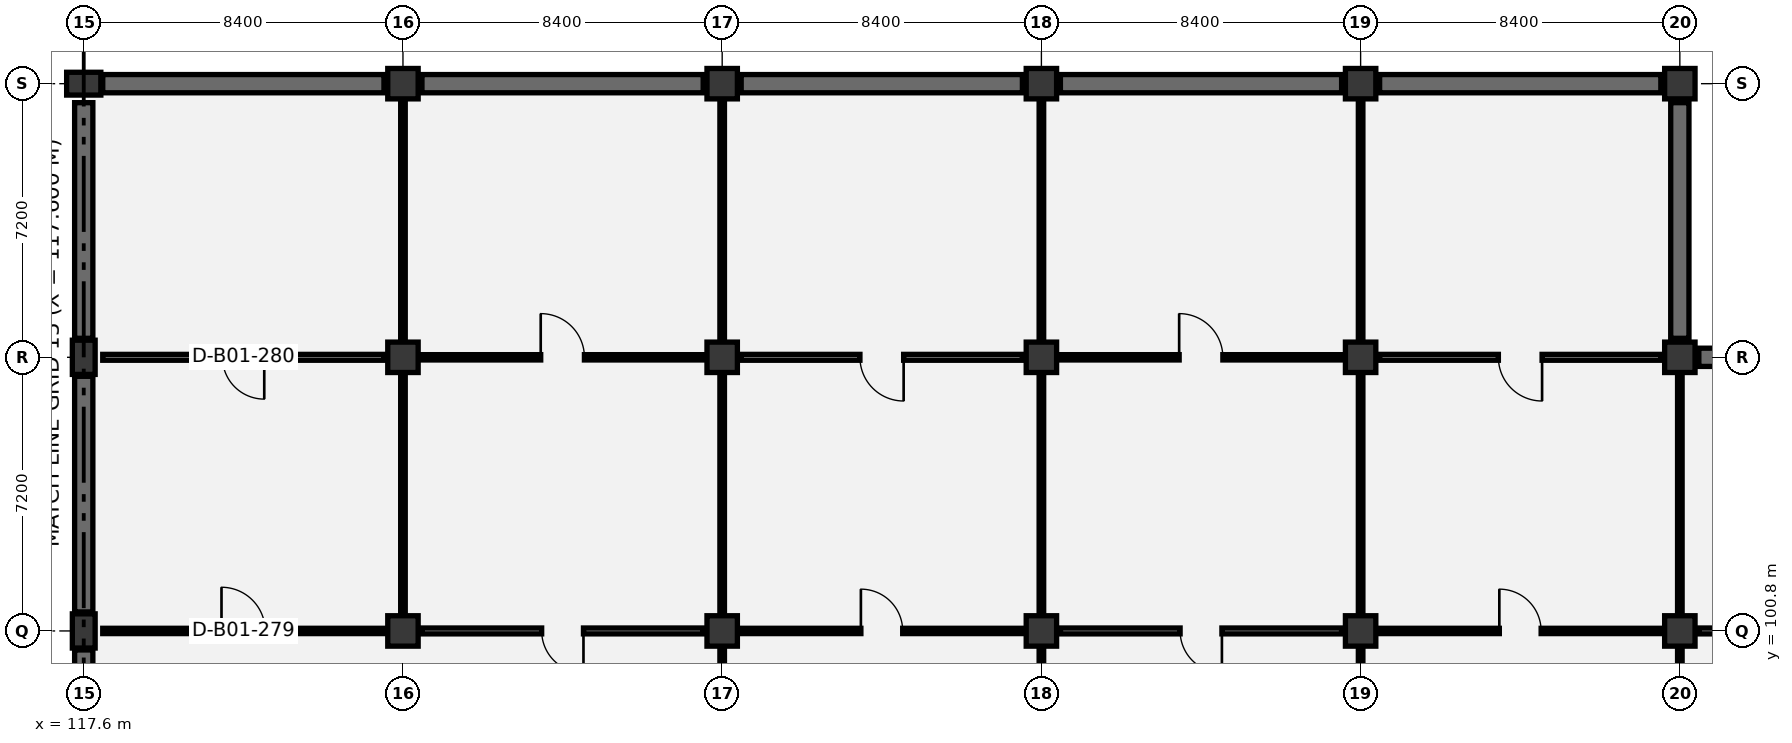
"""IFC4 building model, lengths in metres.
Left out: names, types, materials, properties, quantities, classifications, styles, units other than length and angle.
Written with IfcOpenShell. Run it as: python <this file> out.ifc"""

import sys

from ifc_helpers import new_model, si_unit, direction, frame, frame_2d, origin, origin_2d, place, context, subcontext, project, spatial, rectangle, extrude, element, fill, save


model = new_model("IFC4")
c1 = context("Model", 3, precision=1e-05, world=origin(), true_north=direction((0.0, 1.0)))
c2 = subcontext(c1, "Body", "Model", "MODEL_VIEW")
j1 = project(units=[si_unit("LENGTHUNIT", "METRE"), si_unit("PLANEANGLEUNIT", "RADIAN")], contexts=[c1])
p1 = place(None, origin())
s1 = spatial("IfcSite", under=j1, at=p1, CompositionType="ELEMENT")
p2 = place(p1, origin())
s2 = spatial("IfcBuilding", under=s1, at=p2, CompositionType="ELEMENT")
p3 = place(p2, frame((0.0, 0.0, -4.8)))
s3 = spatial("IfcBuildingStorey", under=s2, at=p3, CompositionType="ELEMENT", Elevation=-4.8)
for number, where, z_axis, x_axis in (
    (1, (117.6, 100.8, 0.0), (0.0, 0.0, 1.0), (1.0, 0.0, 0.0)),
    (2, (117.6, 108.0, 0.0), (0.0, 0.0, 1.0), (1.0, 0.0, 0.0)),
    (3, (117.6, 115.2, 0.0), (0.0, 0.0, 1.0), (0.0, 1.0, 0.0)),
):
    element("IfcColumn", number, at=place(p3, frame(where, z_axis=z_axis, x_axis=x_axis)), inside=s3, PredefinedType="COLUMN", context=c2, shape_type="SweptSolid", body=[
        extrude(rectangle(XDim=0.6, YDim=0.9, at=origin_2d()), origin(), (0.0, 0.0, 1.0), 4.8),
    ])
for number, where, z_axis, x_axis in (
    (4, (126.0, 100.8, 0.0), (0.0, 0.0, 1.0), (1.0, 0.0, 0.0)),
    (5, (126.0, 108.0, 0.0), (0.0, 0.0, 1.0), (1.0, 0.0, 0.0)),
    (6, (126.0, 115.2, 0.0), (0.0, 0.0, 1.0), (1.0, 0.0, 0.0)),
    (7, (134.4, 100.8, 0.0), (0.0, 0.0, 1.0), (1.0, 0.0, 0.0)),
    (8, (134.4, 108.0, 0.0), (0.0, 0.0, 1.0), (1.0, 0.0, 0.0)),
    (9, (134.4, 115.2, 0.0), (0.0, 0.0, 1.0), (1.0, 0.0, 0.0)),
    (10, (142.8, 100.8, 0.0), (0.0, 0.0, 1.0), (1.0, 0.0, 0.0)),
    (11, (142.8, 108.0, 0.0), (0.0, 0.0, 1.0), (1.0, 0.0, 0.0)),
    (12, (142.8, 115.2, 0.0), (0.0, 0.0, 1.0), (1.0, 0.0, 0.0)),
    (13, (151.2, 100.8, 0.0), (0.0, 0.0, 1.0), (1.0, 0.0, 0.0)),
    (14, (151.2, 108.0, 0.0), (0.0, 0.0, 1.0), (1.0, 0.0, 0.0)),
    (15, (151.2, 115.2, 0.0), (0.0, 0.0, 1.0), (1.0, 0.0, 0.0)),
    (16, (159.6, 100.8, 0.0), (0.0, 0.0, 1.0), (1.0, 0.0, 0.0)),
    (17, (159.6, 108.0, 0.0), (0.0, 0.0, 1.0), (1.0, 0.0, 0.0)),
    (18, (159.6, 115.2, 0.0), (0.0, 0.0, 1.0), (1.0, 0.0, 0.0)),
):
    element("IfcColumn", number, at=place(p3, frame(where, z_axis=z_axis, x_axis=x_axis)), inside=s3, PredefinedType="COLUMN", context=c2, shape_type="SweptSolid", body=[
        extrude(rectangle(XDim=0.8, YDim=0.8, at=origin_2d()), origin(), (0.0, 0.0, 1.0), 4.8),
    ])
for number, where, z_axis, x_axis in (
    (19, (117.6, 94.1, 0.0), (0.0, 0.0, 1.0), (0.0, 1.0, 0.0)),
    (20, (117.6, 101.3, 0.0), (0.0, 0.0, 1.0), (0.0, 1.0, 0.0)),
):
    element("IfcWall", number, at=place(p3, frame(where, z_axis=z_axis, x_axis=x_axis)), inside=s3, PredefinedType="USERDEFINED", context=c2, shape_type="SweptSolid", body=[
        extrude(rectangle(XDim=6.2, YDim=0.48, at=frame_2d((3.1, 0.0))), origin(), (0.0, 0.0, 1.0), 4.575),
    ])
p4 = place(p3, frame((118.1, 115.2, 0.0), z_axis=(0.0, 0.0, 1.0), x_axis=(1.0, 0.0, 0.0)))
e21 = element("IfcWall", 21, at=p4, inside=s3, PredefinedType="USERDEFINED", context=c2, shape_type="SweptSolid", body=[
    extrude(rectangle(XDim=7.4, YDim=0.48, at=frame_2d((3.7, 0.0))), origin(), (0.0, 0.0, 1.0), 4.45),
])
p5 = place(p3, frame((117.6, 108.5, 0.0), z_axis=(0.0, 0.0, 1.0), x_axis=(0.0, 1.0, 0.0)))
e22 = element("IfcWall", 22, at=p5, inside=s3, PredefinedType="USERDEFINED", context=c2, shape_type="SweptSolid", body=[
    extrude(rectangle(XDim=6.2, YDim=0.48, at=frame_2d((3.1, 0.0))), origin(), (0.0, 0.0, 1.0), 4.575),
])
p6 = place(p3, frame((126.5, 115.2, 0.0), z_axis=(0.0, 0.0, 1.0), x_axis=(1.0, 0.0, 0.0)))
e23 = element("IfcWall", 23, at=p6, inside=s3, PredefinedType="USERDEFINED", context=c2, shape_type="SweptSolid", body=[
    extrude(rectangle(XDim=7.4, YDim=0.48, at=frame_2d((3.7, 0.0))), origin(), (0.0, 0.0, 1.0), 4.45),
])
p7 = place(p3, frame((134.9, 115.2, 0.0), z_axis=(0.0, 0.0, 1.0), x_axis=(1.0, 0.0, 0.0)))
e24 = element("IfcWall", 24, at=p7, inside=s3, PredefinedType="USERDEFINED", context=c2, shape_type="SweptSolid", body=[
    extrude(rectangle(XDim=7.4, YDim=0.48, at=frame_2d((3.7, 0.0))), origin(), (0.0, 0.0, 1.0), 4.45),
])
p8 = place(p3, frame((143.3, 115.2, 0.0), z_axis=(0.0, 0.0, 1.0), x_axis=(1.0, 0.0, 0.0)))
e25 = element("IfcWall", 25, at=p8, inside=s3, PredefinedType="USERDEFINED", context=c2, shape_type="SweptSolid", body=[
    extrude(rectangle(XDim=7.4, YDim=0.48, at=frame_2d((3.7, 0.0))), origin(), (0.0, 0.0, 1.0), 4.45),
])
p9 = place(p3, frame((151.7, 115.2, 0.0), z_axis=(0.0, 0.0, 1.0), x_axis=(1.0, 0.0, 0.0)))
e26 = element("IfcWall", 26, at=p9, inside=s3, PredefinedType="USERDEFINED", context=c2, shape_type="SweptSolid", body=[
    extrude(rectangle(XDim=7.4, YDim=0.48, at=frame_2d((3.7, 0.0))), origin(), (0.0, 0.0, 1.0), 4.45),
])
p10 = place(p3, frame((159.6, 108.5, 0.0), z_axis=(0.0, 0.0, 1.0), x_axis=(0.0, 1.0, 0.0)))
e27 = element("IfcWall", 27, at=p10, inside=s3, PredefinedType="USERDEFINED", context=c2, shape_type="SweptSolid", body=[
    extrude(rectangle(XDim=6.2, YDim=0.48, at=frame_2d((3.1, 0.0))), origin(), (0.0, 0.0, 1.0), 4.45),
])
p11 = place(p3, frame((160.1, 108.0, 0.0), z_axis=(0.0, 0.0, 1.0), x_axis=(1.0, 0.0, 0.0)))
e28 = element("IfcWall", 28, at=p11, inside=s3, PredefinedType="USERDEFINED", context=c2, shape_type="SweptSolid", body=[
    extrude(rectangle(XDim=7.4, YDim=0.48, at=frame_2d((3.7, 0.0))), origin(), (0.0, 0.0, 1.0), 4.45),
])
p12 = place(p3, frame((159.72, 115.2, 0.0), z_axis=(0.0, 0.0, 1.0), x_axis=(1.0, 0.0, 0.0)))
e29 = element("IfcWall", 29, at=p12, inside=s3, PredefinedType="PARAPET", context=c2, shape_type="SweptSolid", body=[
    extrude(rectangle(XDim=8.16, YDim=0.22, at=frame_2d((4.08, 0.0))), origin(), (0.0, 0.0, 1.0), 1.15),
])
p13 = place(p3, frame((118.1, 100.8, 0.0), z_axis=(0.0, 0.0, 1.0), x_axis=(1.0, 0.0, 0.0)))
e30 = element("IfcWall", 30, at=p13, inside=s3, PredefinedType="PARTITIONING", context=c2, shape_type="SweptSolid", body=[
    extrude(rectangle(XDim=7.4, YDim=0.14, at=frame_2d((3.7, 0.0))), origin(), (0.0, 0.0, 1.0), 3.545),
])
p14 = place(p13, frame((3.125, 0.0, 0.0)))
e31 = element("IfcOpeningElement", 31, at=p14, cuts=e30, PredefinedType="OPENING", context=c2, shape_type="SweptSolid", body=[
    extrude(rectangle(XDim=1.15, YDim=2.1, at=frame_2d((0.575, 1.05))), frame((0.0, 0.08, 0.0), z_axis=(0.0, -1.0, 0.0), x_axis=(1.0, 0.0, 0.0)), (0.0, 0.0, 1.0), 0.16),
])
p15 = place(p3, frame((126.0, 101.3, 0.0), z_axis=(0.0, 0.0, 1.0), x_axis=(0.0, 1.0, 0.0)))
e32 = element("IfcWall", 32, at=p15, inside=s3, PredefinedType="PARTITIONING", context=c2, shape_type="SweptSolid", body=[
    extrude(rectangle(XDim=6.2, YDim=0.12, at=frame_2d((3.1, 0.0))), origin(), (0.0, 0.0, 1.0), 3.645),
])
p16 = place(p3, frame((118.1, 108.0, 0.0), z_axis=(0.0, 0.0, 1.0), x_axis=(1.0, 0.0, 0.0)))
e33 = element("IfcWall", 33, at=p16, inside=s3, PredefinedType="PARTITIONING", context=c2, shape_type="SweptSolid", body=[
    extrude(rectangle(XDim=7.4, YDim=0.155, at=frame_2d((3.7, 0.0))), origin(), (0.0, 0.0, 1.0), 3.545),
])
p17 = place(p16, frame((3.15, 0.0, 0.0)))
e34 = element("IfcOpeningElement", 34, at=p17, cuts=e33, PredefinedType="OPENING", context=c2, shape_type="SweptSolid", body=[
    extrude(rectangle(XDim=1.1, YDim=2.1, at=frame_2d((0.55, 1.05))), frame((0.0, 0.087, 0.0), z_axis=(0.0, -1.0, 0.0), x_axis=(1.0, 0.0, 0.0)), (0.0, 0.0, 1.0), 0.175),
])
for number, where, z_axis, x_axis in (
    (35, (126.0, 108.5, 0.0), (0.0, 0.0, 1.0), (0.0, 1.0, 0.0)),
    (36, (134.4, 94.1, 0.0), (0.0, 0.0, 1.0), (0.0, 1.0, 0.0)),
):
    element("IfcWall", number, at=place(p3, frame(where, z_axis=z_axis, x_axis=x_axis)), inside=s3, PredefinedType="PARTITIONING", context=c2, shape_type="SweptSolid", body=[
        extrude(rectangle(XDim=6.2, YDim=0.12, at=frame_2d((3.1, 0.0))), origin(), (0.0, 0.0, 1.0), 3.645),
    ])
p18 = place(p3, frame((126.5, 100.8, 0.0), z_axis=(0.0, 0.0, 1.0), x_axis=(1.0, 0.0, 0.0)))
e37 = element("IfcWall", 37, at=p18, inside=s3, PredefinedType="PARTITIONING", context=c2, shape_type="SweptSolid", body=[
    extrude(rectangle(XDim=7.4, YDim=0.155, at=frame_2d((3.7, 0.0))), origin(), (0.0, 0.0, 1.0), 3.545),
])
p19 = place(p18, frame((3.15, 0.0, 0.0)))
e38 = element("IfcOpeningElement", 38, at=p19, cuts=e37, PredefinedType="OPENING", context=c2, shape_type="SweptSolid", body=[
    extrude(rectangle(XDim=1.1, YDim=2.1, at=frame_2d((0.55, 1.05))), frame((0.0, 0.087, 0.0), z_axis=(0.0, -1.0, 0.0), x_axis=(1.0, 0.0, 0.0)), (0.0, 0.0, 1.0), 0.175),
])
p20 = place(p3, frame((134.4, 101.3, 0.0), z_axis=(0.0, 0.0, 1.0), x_axis=(0.0, 1.0, 0.0)))
e39 = element("IfcWall", 39, at=p20, inside=s3, PredefinedType="PARTITIONING", context=c2, shape_type="SweptSolid", body=[
    extrude(rectangle(XDim=6.2, YDim=0.12, at=frame_2d((3.1, 0.0))), origin(), (0.0, 0.0, 1.0), 3.645),
])
p21 = place(p3, frame((126.5, 108.0, 0.0), z_axis=(0.0, 0.0, 1.0), x_axis=(1.0, 0.0, 0.0)))
e40 = element("IfcWall", 40, at=p21, inside=s3, PredefinedType="PARTITIONING", context=c2, shape_type="SweptSolid", body=[
    extrude(rectangle(XDim=7.4, YDim=0.14, at=frame_2d((3.7, 0.0))), origin(), (0.0, 0.0, 1.0), 3.545),
])
p22 = place(p21, frame((3.125, 0.0, 0.0)))
e41 = element("IfcOpeningElement", 41, at=p22, cuts=e40, PredefinedType="OPENING", context=c2, shape_type="SweptSolid", body=[
    extrude(rectangle(XDim=1.15, YDim=2.1, at=frame_2d((0.575, 1.05))), frame((0.0, 0.08, 0.0), z_axis=(0.0, -1.0, 0.0), x_axis=(1.0, 0.0, 0.0)), (0.0, 0.0, 1.0), 0.16),
])
for number, where, z_axis, x_axis in (
    (42, (134.4, 108.5, 0.0), (0.0, 0.0, 1.0), (0.0, 1.0, 0.0)),
    (43, (142.8, 94.1, 0.0), (0.0, 0.0, 1.0), (0.0, 1.0, 0.0)),
):
    element("IfcWall", number, at=place(p3, frame(where, z_axis=z_axis, x_axis=x_axis)), inside=s3, PredefinedType="PARTITIONING", context=c2, shape_type="SweptSolid", body=[
        extrude(rectangle(XDim=6.2, YDim=0.12, at=frame_2d((3.1, 0.0))), origin(), (0.0, 0.0, 1.0), 3.645),
    ])
p23 = place(p3, frame((134.9, 100.8, 0.0), z_axis=(0.0, 0.0, 1.0), x_axis=(1.0, 0.0, 0.0)))
e44 = element("IfcWall", 44, at=p23, inside=s3, PredefinedType="PARTITIONING", context=c2, shape_type="SweptSolid", body=[
    extrude(rectangle(XDim=7.4, YDim=0.14, at=frame_2d((3.7, 0.0))), origin(), (0.0, 0.0, 1.0), 3.545),
])
p24 = place(p23, frame((3.15, 0.0, 0.0)))
e45 = element("IfcOpeningElement", 45, at=p24, cuts=e44, PredefinedType="OPENING", context=c2, shape_type="SweptSolid", body=[
    extrude(rectangle(XDim=1.1, YDim=2.1, at=frame_2d((0.55, 1.05))), frame((0.0, 0.08, 0.0), z_axis=(0.0, -1.0, 0.0), x_axis=(1.0, 0.0, 0.0)), (0.0, 0.0, 1.0), 0.16),
])
p25 = place(p3, frame((142.8, 101.3, 0.0), z_axis=(0.0, 0.0, 1.0), x_axis=(0.0, 1.0, 0.0)))
e46 = element("IfcWall", 46, at=p25, inside=s3, PredefinedType="PARTITIONING", context=c2, shape_type="SweptSolid", body=[
    extrude(rectangle(XDim=6.2, YDim=0.12, at=frame_2d((3.1, 0.0))), origin(), (0.0, 0.0, 1.0), 3.645),
])
p26 = place(p3, frame((134.9, 108.0, 0.0), z_axis=(0.0, 0.0, 1.0), x_axis=(1.0, 0.0, 0.0)))
e47 = element("IfcWall", 47, at=p26, inside=s3, PredefinedType="PARTITIONING", context=c2, shape_type="SweptSolid", body=[
    extrude(rectangle(XDim=7.4, YDim=0.155, at=frame_2d((3.7, 0.0))), origin(), (0.0, 0.0, 1.0), 3.545),
])
p27 = place(p26, frame((3.125, 0.0, 0.0)))
e48 = element("IfcOpeningElement", 48, at=p27, cuts=e47, PredefinedType="OPENING", context=c2, shape_type="SweptSolid", body=[
    extrude(rectangle(XDim=1.15, YDim=2.1, at=frame_2d((0.575, 1.05))), frame((0.0, 0.087, 0.0), z_axis=(0.0, -1.0, 0.0), x_axis=(1.0, 0.0, 0.0)), (0.0, 0.0, 1.0), 0.175),
])
for number, where, z_axis, x_axis in (
    (49, (142.8, 108.5, 0.0), (0.0, 0.0, 1.0), (0.0, 1.0, 0.0)),
    (50, (151.2, 94.1, 0.0), (0.0, 0.0, 1.0), (0.0, 1.0, 0.0)),
):
    element("IfcWall", number, at=place(p3, frame(where, z_axis=z_axis, x_axis=x_axis)), inside=s3, PredefinedType="PARTITIONING", context=c2, shape_type="SweptSolid", body=[
        extrude(rectangle(XDim=6.2, YDim=0.12, at=frame_2d((3.1, 0.0))), origin(), (0.0, 0.0, 1.0), 3.645),
    ])
p28 = place(p3, frame((143.3, 100.8, 0.0), z_axis=(0.0, 0.0, 1.0), x_axis=(1.0, 0.0, 0.0)))
e51 = element("IfcWall", 51, at=p28, inside=s3, PredefinedType="PARTITIONING", context=c2, shape_type="SweptSolid", body=[
    extrude(rectangle(XDim=7.4, YDim=0.155, at=frame_2d((3.7, 0.0))), origin(), (0.0, 0.0, 1.0), 3.545),
])
p29 = place(p28, frame((3.15, 0.0, 0.0)))
e52 = element("IfcOpeningElement", 52, at=p29, cuts=e51, PredefinedType="OPENING", context=c2, shape_type="SweptSolid", body=[
    extrude(rectangle(XDim=1.1, YDim=2.1, at=frame_2d((0.55, 1.05))), frame((0.0, 0.087, 0.0), z_axis=(0.0, -1.0, 0.0), x_axis=(1.0, 0.0, 0.0)), (0.0, 0.0, 1.0), 0.175),
])
p30 = place(p3, frame((151.2, 101.3, 0.0), z_axis=(0.0, 0.0, 1.0), x_axis=(0.0, 1.0, 0.0)))
e53 = element("IfcWall", 53, at=p30, inside=s3, PredefinedType="PARTITIONING", context=c2, shape_type="SweptSolid", body=[
    extrude(rectangle(XDim=6.2, YDim=0.12, at=frame_2d((3.1, 0.0))), origin(), (0.0, 0.0, 1.0), 3.645),
])
p31 = place(p3, frame((143.3, 108.0, 0.0), z_axis=(0.0, 0.0, 1.0), x_axis=(1.0, 0.0, 0.0)))
e54 = element("IfcWall", 54, at=p31, inside=s3, PredefinedType="PARTITIONING", context=c2, shape_type="SweptSolid", body=[
    extrude(rectangle(XDim=7.4, YDim=0.14, at=frame_2d((3.7, 0.0))), origin(), (0.0, 0.0, 1.0), 3.545),
])
p32 = place(p31, frame((3.125, 0.0, 0.0)))
e55 = element("IfcOpeningElement", 55, at=p32, cuts=e54, PredefinedType="OPENING", context=c2, shape_type="SweptSolid", body=[
    extrude(rectangle(XDim=1.15, YDim=2.1, at=frame_2d((0.575, 1.05))), frame((0.0, 0.08, 0.0), z_axis=(0.0, -1.0, 0.0), x_axis=(1.0, 0.0, 0.0)), (0.0, 0.0, 1.0), 0.16),
])
for number, where, z_axis, x_axis in (
    (56, (151.2, 108.5, 0.0), (0.0, 0.0, 1.0), (0.0, 1.0, 0.0)),
    (57, (159.6, 94.1, 0.0), (0.0, 0.0, 1.0), (0.0, 1.0, 0.0)),
):
    element("IfcWall", number, at=place(p3, frame(where, z_axis=z_axis, x_axis=x_axis)), inside=s3, PredefinedType="PARTITIONING", context=c2, shape_type="SweptSolid", body=[
        extrude(rectangle(XDim=6.2, YDim=0.12, at=frame_2d((3.1, 0.0))), origin(), (0.0, 0.0, 1.0), 3.645),
    ])
p33 = place(p3, frame((151.7, 100.8, 0.0), z_axis=(0.0, 0.0, 1.0), x_axis=(1.0, 0.0, 0.0)))
e58 = element("IfcWall", 58, at=p33, inside=s3, PredefinedType="PARTITIONING", context=c2, shape_type="SweptSolid", body=[
    extrude(rectangle(XDim=7.4, YDim=0.14, at=frame_2d((3.7, 0.0))), origin(), (0.0, 0.0, 1.0), 3.545),
])
p34 = place(p33, frame((3.15, 0.0, 0.0)))
e59 = element("IfcOpeningElement", 59, at=p34, cuts=e58, PredefinedType="OPENING", context=c2, shape_type="SweptSolid", body=[
    extrude(rectangle(XDim=1.1, YDim=2.1, at=frame_2d((0.55, 1.05))), frame((0.0, 0.08, 0.0), z_axis=(0.0, -1.0, 0.0), x_axis=(1.0, 0.0, 0.0)), (0.0, 0.0, 1.0), 0.16),
])
p35 = place(p3, frame((159.6, 101.3, 0.0), z_axis=(0.0, 0.0, 1.0), x_axis=(0.0, 1.0, 0.0)))
e60 = element("IfcWall", 60, at=p35, inside=s3, PredefinedType="PARTITIONING", context=c2, shape_type="SweptSolid", body=[
    extrude(rectangle(XDim=6.2, YDim=0.12, at=frame_2d((3.1, 0.0))), origin(), (0.0, 0.0, 1.0), 3.645),
])
p36 = place(p3, frame((151.7, 108.0, 0.0), z_axis=(0.0, 0.0, 1.0), x_axis=(1.0, 0.0, 0.0)))
e61 = element("IfcWall", 61, at=p36, inside=s3, PredefinedType="PARTITIONING", context=c2, shape_type="SweptSolid", body=[
    extrude(rectangle(XDim=7.4, YDim=0.155, at=frame_2d((3.7, 0.0))), origin(), (0.0, 0.0, 1.0), 3.545),
])
p37 = place(p36, frame((3.125, 0.0, 0.0)))
e62 = element("IfcOpeningElement", 62, at=p37, cuts=e61, PredefinedType="OPENING", context=c2, shape_type="SweptSolid", body=[
    extrude(rectangle(XDim=1.15, YDim=2.1, at=frame_2d((0.575, 1.05))), frame((0.0, 0.087, 0.0), z_axis=(0.0, -1.0, 0.0), x_axis=(1.0, 0.0, 0.0)), (0.0, 0.0, 1.0), 0.175),
])
p38 = place(p3, frame((160.1, 100.8, 0.0), z_axis=(0.0, 0.0, 1.0), x_axis=(1.0, 0.0, 0.0)))
e63 = element("IfcWall", 63, at=p38, inside=s3, PredefinedType="PARTITIONING", context=c2, shape_type="SweptSolid", body=[
    extrude(rectangle(XDim=7.4, YDim=0.155, at=frame_2d((3.7, 0.0))), origin(), (0.0, 0.0, 1.0), 3.545),
])
p39 = place(p38, frame((3.125, 0.0, 0.0)))
e64 = element("IfcOpeningElement", 64, at=p39, cuts=e63, PredefinedType="OPENING", context=c2, shape_type="SweptSolid", body=[
    extrude(rectangle(XDim=1.15, YDim=2.1, at=frame_2d((0.575, 1.05))), frame((0.0, 0.087, 0.0), z_axis=(0.0, -1.0, 0.0), x_axis=(1.0, 0.0, 0.0)), (0.0, 0.0, 1.0), 0.175),
])
p40 = place(p14, origin())
e65 = element("IfcDoor", 65, at=p40, inside=s3, OperationType="SINGLE_SWING_LEFT", PredefinedType="DOOR", context=c2, shape_type="SweptSolid", body=[
    extrude(rectangle(XDim=1.15, YDim=2.1, at=frame_2d((0.575, 1.05))), frame((0.0, 0.025, 0.0), z_axis=(0.0, -1.0, 0.0), x_axis=(1.0, 0.0, 0.0)), (0.0, 0.0, 1.0), 0.05),
])
fill(e31, e65)
p41 = place(p17, frame((1.1, 0.0, 0.0), z_axis=(0.0, 0.0, 1.0), x_axis=(-1.0, 0.0, 0.0)))
e66 = element("IfcDoor", 66, at=p41, inside=s3, OperationType="SINGLE_SWING_LEFT", PredefinedType="DOOR", context=c2, shape_type="SweptSolid", body=[
    extrude(rectangle(XDim=1.1, YDim=2.1, at=frame_2d((0.55, 1.05))), frame((0.0, 0.025, 0.0), z_axis=(0.0, -1.0, 0.0), x_axis=(1.0, 0.0, 0.0)), (0.0, 0.0, 1.0), 0.05),
])
fill(e34, e66)
p42 = place(p19, frame((1.1, 0.0, 0.0), z_axis=(0.0, 0.0, 1.0), x_axis=(-1.0, 0.0, 0.0)))
e67 = element("IfcDoor", 67, at=p42, inside=s3, OperationType="SINGLE_SWING_LEFT", PredefinedType="DOOR", context=c2, shape_type="SweptSolid", body=[
    extrude(rectangle(XDim=1.1, YDim=2.1, at=frame_2d((0.55, 1.05))), frame((0.0, 0.025, 0.0), z_axis=(0.0, -1.0, 0.0), x_axis=(1.0, 0.0, 0.0)), (0.0, 0.0, 1.0), 0.05),
])
fill(e38, e67)
p43 = place(p22, origin())
e68 = element("IfcDoor", 68, at=p43, inside=s3, OperationType="SINGLE_SWING_LEFT", PredefinedType="DOOR", context=c2, shape_type="SweptSolid", body=[
    extrude(rectangle(XDim=1.15, YDim=2.1, at=frame_2d((0.575, 1.05))), frame((0.0, 0.025, 0.0), z_axis=(0.0, -1.0, 0.0), x_axis=(1.0, 0.0, 0.0)), (0.0, 0.0, 1.0), 0.05),
])
fill(e41, e68)
p44 = place(p24, origin())
e69 = element("IfcDoor", 69, at=p44, inside=s3, OperationType="SINGLE_SWING_LEFT", PredefinedType="DOOR", context=c2, shape_type="SweptSolid", body=[
    extrude(rectangle(XDim=1.1, YDim=2.1, at=frame_2d((0.55, 1.05))), frame((0.0, 0.025, 0.0), z_axis=(0.0, -1.0, 0.0), x_axis=(1.0, 0.0, 0.0)), (0.0, 0.0, 1.0), 0.05),
])
fill(e45, e69)
p45 = place(p27, frame((1.15, 0.0, 0.0), z_axis=(0.0, 0.0, 1.0), x_axis=(-1.0, 0.0, 0.0)))
e70 = element("IfcDoor", 70, at=p45, inside=s3, OperationType="SINGLE_SWING_LEFT", PredefinedType="DOOR", context=c2, shape_type="SweptSolid", body=[
    extrude(rectangle(XDim=1.15, YDim=2.1, at=frame_2d((0.575, 1.05))), frame((0.0, 0.025, 0.0), z_axis=(0.0, -1.0, 0.0), x_axis=(1.0, 0.0, 0.0)), (0.0, 0.0, 1.0), 0.05),
])
fill(e48, e70)
p46 = place(p29, frame((1.1, 0.0, 0.0), z_axis=(0.0, 0.0, 1.0), x_axis=(-1.0, 0.0, 0.0)))
e71 = element("IfcDoor", 71, at=p46, inside=s3, OperationType="SINGLE_SWING_LEFT", PredefinedType="DOOR", context=c2, shape_type="SweptSolid", body=[
    extrude(rectangle(XDim=1.1, YDim=2.1, at=frame_2d((0.55, 1.05))), frame((0.0, 0.025, 0.0), z_axis=(0.0, -1.0, 0.0), x_axis=(1.0, 0.0, 0.0)), (0.0, 0.0, 1.0), 0.05),
])
fill(e52, e71)
p47 = place(p32, origin())
e72 = element("IfcDoor", 72, at=p47, inside=s3, OperationType="SINGLE_SWING_LEFT", PredefinedType="DOOR", context=c2, shape_type="SweptSolid", body=[
    extrude(rectangle(XDim=1.15, YDim=2.1, at=frame_2d((0.575, 1.05))), frame((0.0, 0.025, 0.0), z_axis=(0.0, -1.0, 0.0), x_axis=(1.0, 0.0, 0.0)), (0.0, 0.0, 1.0), 0.05),
])
fill(e55, e72)
p48 = place(p34, origin())
e73 = element("IfcDoor", 73, at=p48, inside=s3, OperationType="SINGLE_SWING_LEFT", PredefinedType="DOOR", context=c2, shape_type="SweptSolid", body=[
    extrude(rectangle(XDim=1.1, YDim=2.1, at=frame_2d((0.55, 1.05))), frame((0.0, 0.025, 0.0), z_axis=(0.0, -1.0, 0.0), x_axis=(1.0, 0.0, 0.0)), (0.0, 0.0, 1.0), 0.05),
])
fill(e59, e73)
p49 = place(p37, frame((1.15, 0.0, 0.0), z_axis=(0.0, 0.0, 1.0), x_axis=(-1.0, 0.0, 0.0)))
e74 = element("IfcDoor", 74, at=p49, inside=s3, OperationType="SINGLE_SWING_LEFT", PredefinedType="DOOR", context=c2, shape_type="SweptSolid", body=[
    extrude(rectangle(XDim=1.15, YDim=2.1, at=frame_2d((0.575, 1.05))), frame((0.0, 0.025, 0.0), z_axis=(0.0, -1.0, 0.0), x_axis=(1.0, 0.0, 0.0)), (0.0, 0.0, 1.0), 0.05),
])
fill(e62, e74)
save(model, sys.argv[1])
